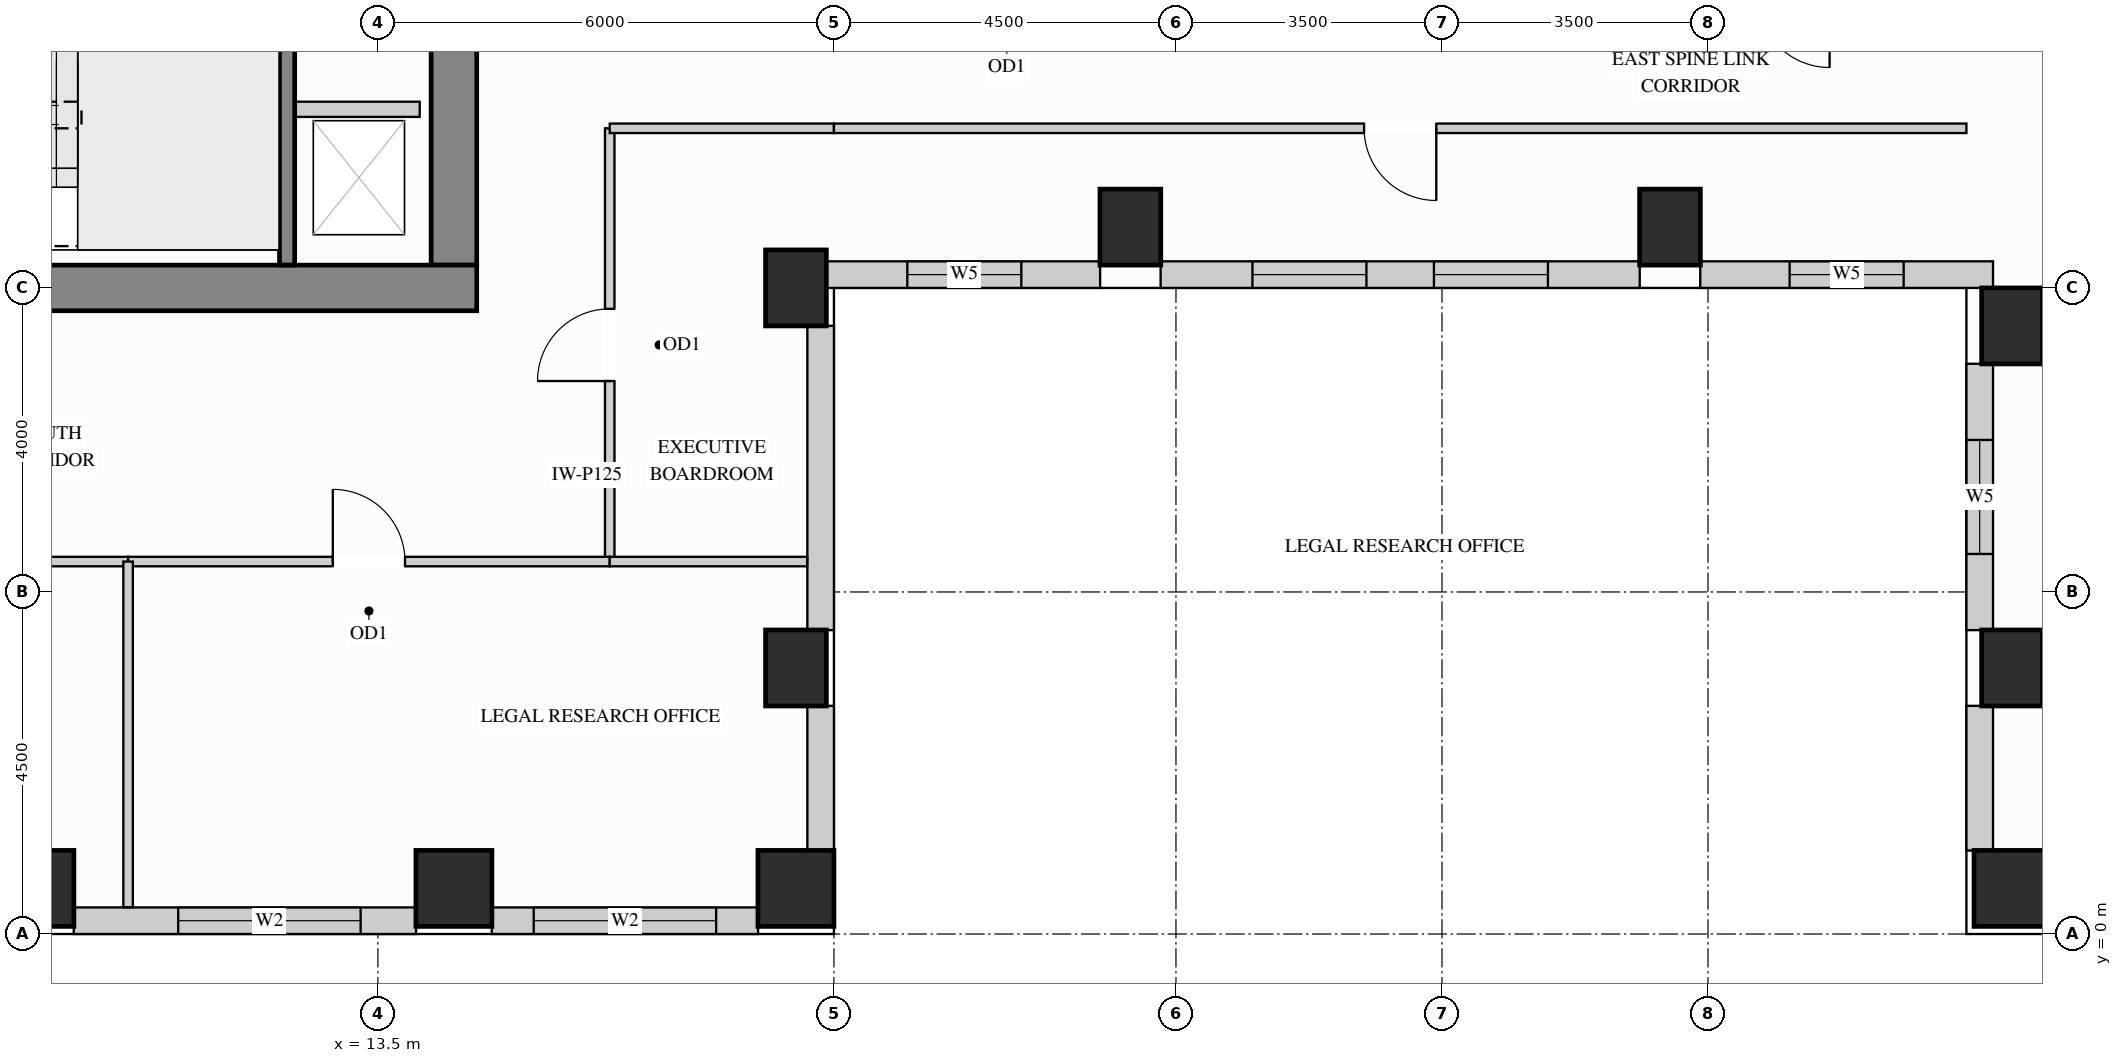
"""IFC4 building model, lengths in metres.
Left out: names, types, materials, properties, quantities, classifications, styles, units other than length and angle.
Written with IfcOpenShell. Run it as: python <this file> out.ifc"""

import sys

from ifc_helpers import new_model, si_unit, direction, frame, frame_2d, origin, origin_2d, place, context, subcontext, project, spatial, rectangle, extrude, source, transform, mapped, element, fill, save


model = new_model("IFC4")
c1 = context("Model", 3, precision=1e-05, world=origin(), true_north=direction((0.0, 1.0)))
c2 = subcontext(c1, "Body", "Model", "MODEL_VIEW")
j1 = project(units=[si_unit("LENGTHUNIT", "METRE"), si_unit("PLANEANGLEUNIT", "RADIAN")], contexts=[c1])
p1 = place(None, origin())
s1 = spatial("IfcSite", under=j1, at=p1, CompositionType="ELEMENT")
p2 = place(p1, origin())
s2 = spatial("IfcBuilding", under=s1, at=p2, CompositionType="ELEMENT")
p3 = place(p2, frame((0.0, 0.0, 153.9)))
s3 = spatial("IfcBuildingStorey", under=s2, at=p3, CompositionType="ELEMENT", Elevation=153.9)
m1 = source(origin(), c2, "Body", "SweptSolid", [
    extrude(rectangle(XDim=0.8, YDim=1.0, at=origin_2d()), origin(), (0.0, 0.0, 1.0), 3.4),
])
for number, where, z_axis, x_axis in (
    (1, (19.0, 3.5, 0.0), (0.0, 0.0, 1.0), (1.0, 0.0, 0.0)),
    (2, (19.0, 8.5, 0.0), (0.0, 0.0, 1.0), (1.0, 0.0, 0.0)),
    (3, (35.0, 3.5, 0.0), (0.0, 0.0, 1.0), (1.0, 0.0, 0.0)),
    (4, (35.0, 8.0, 0.0), (0.0, 0.0, 1.0), (1.0, 0.0, 0.0)),
    (5, (23.4, 9.3, 0.0), (0.0, 0.0, 1.0), (1.0, 0.0, 0.0)),
    (6, (30.5, 9.3, 0.0), (0.0, 0.0, 1.0), (1.0, 0.0, 0.0)),
):
    element("IfcColumn", number, at=place(p3, frame(where, z_axis=z_axis, x_axis=x_axis)), inside=s3, PredefinedType="COLUMN", context=c2, shape_type="MappedRepresentation", body=[
        mapped(m1, transform((0.0, 0.0, 0.0), x_axis=(1.0, 0.0, 0.0), y_axis=(0.0, 1.0, 0.0), z_axis=(0.0, 0.0, 1.0))),
    ])
m2 = source(origin(), c2, "Body", "SweptSolid", [
    extrude(rectangle(XDim=1.0, YDim=1.0, at=origin_2d()), origin(), (0.0, 0.0, 1.0), 3.4),
])
for number, where, z_axis, x_axis in (
    (7, (14.5, 0.6, 0.0), (0.0, 0.0, 1.0), (1.0, 0.0, 0.0)),
    (8, (19.0, 0.6, 0.0), (0.0, 0.0, 1.0), (1.0, 0.0, 0.0)),
    (9, (35.0, 0.6, 0.0), (0.0, 0.0, 1.0), (1.0, 0.0, 0.0)),
    (10, (9.0, 0.6, 0.0), (0.0, 0.0, 1.0), (1.0, 0.0, 0.0)),
):
    element("IfcColumn", number, at=place(p3, frame(where, z_axis=z_axis, x_axis=x_axis)), inside=s3, PredefinedType="COLUMN", context=c2, shape_type="MappedRepresentation", body=[
        mapped(m2, transform((0.0, 0.0, 0.0), x_axis=(1.0, 0.0, 0.0), y_axis=(0.0, 1.0, 0.0), z_axis=(0.0, 0.0, 1.0))),
    ])
m3 = source(origin(), c2, "Body", "SweptSolid", [
    extrude(rectangle(XDim=10.02, YDim=0.6, at=frame_2d((5.01, 0.0))), origin(), (0.0, 0.0, 1.0), 3.4),
])
p4 = place(p3, frame((14.5, 8.8, 0.0), z_axis=(0.0, 0.0, 1.0), x_axis=(0.0, 1.0, 0.0)))
e11 = element("IfcWall", 11, at=p4, inside=s3, PredefinedType="SHEAR", context=c2, shape_type="MappedRepresentation", body=[
    mapped(m3, transform((0.0, 0.0, 0.0), x_axis=(1.0, 0.0, 0.0), y_axis=(0.0, 1.0, 0.0), z_axis=(0.0, 0.0, 1.0))),
])
m4 = source(origin(), c2, "Body", "SweptSolid", [
    extrude(rectangle(XDim=10.6, YDim=0.6, at=frame_2d((5.3, 0.0))), origin(), (0.0, 0.0, 1.0), 3.4),
])
p5 = place(p3, frame((4.2, 8.5, 0.0), z_axis=(0.0, 0.0, 1.0), x_axis=(1.0, 0.0, 0.0)))
e12 = element("IfcWall", 12, at=p5, inside=s3, PredefinedType="SHEAR", context=c2, shape_type="MappedRepresentation", body=[
    mapped(m4, transform((0.0, 0.0, 0.0), x_axis=(1.0, 0.0, 0.0), y_axis=(0.0, 1.0, 0.0), z_axis=(0.0, 0.0, 1.0))),
])
p6 = place(p3, frame((9.498, 0.175, 0.0), z_axis=(0.0, 0.0, 1.0), x_axis=(1.0, 0.0, 0.0)))
e13 = element("IfcWall", 13, at=p6, inside=s3, PredefinedType="SOLIDWALL", context=c2, shape_type="SweptSolid", body=[
    extrude(rectangle(XDim=4.504, YDim=0.35, at=frame_2d((2.252, 0.0))), origin(), (0.0, 0.0, 1.0), 2.612),
])
p7 = place(p6, frame((1.375, 0.0, 0.78)))
e14 = element("IfcOpeningElement", 14, at=p7, cuts=e13, PredefinedType="OPENING", context=c2, shape_type="SweptSolid", body=[
    extrude(rectangle(XDim=2.4, YDim=1.652, at=frame_2d((1.2, 0.826))), frame((0.0, 0.185, 0.0), z_axis=(0.0, -1.0, 0.0), x_axis=(1.0, 0.0, 0.0)), (0.0, 0.0, 1.0), 0.37),
])
p8 = place(p3, frame((14.998, 0.175, 0.0), z_axis=(0.0, 0.0, 1.0), x_axis=(1.0, 0.0, 0.0)))
e15 = element("IfcWall", 15, at=p8, inside=s3, PredefinedType="SOLIDWALL", context=c2, shape_type="SweptSolid", body=[
    extrude(rectangle(XDim=3.504, YDim=0.35, at=frame_2d((1.752, 0.0))), origin(), (0.0, 0.0, 1.0), 2.612),
])
p9 = place(p8, frame((0.552, 0.0, 0.78)))
e16 = element("IfcOpeningElement", 16, at=p9, cuts=e15, PredefinedType="OPENING", context=c2, shape_type="SweptSolid", body=[
    extrude(rectangle(XDim=2.4, YDim=1.652, at=frame_2d((1.2, 0.826))), frame((0.0, 0.185, 0.0), z_axis=(0.0, -1.0, 0.0), x_axis=(1.0, 0.0, 0.0)), (0.0, 0.0, 1.0), 0.37),
])
m5 = source(origin(), c2, "Body", "SweptSolid", [
    extrude(rectangle(XDim=1.904, YDim=0.35, at=frame_2d((0.952, 0.0))), origin(), (0.0, 0.0, 1.0), 2.612),
])
p10 = place(p3, frame((19.325, 1.098, 0.0), z_axis=(0.0, 0.0, 1.0), x_axis=(0.0, 1.0, 0.0)))
e17 = element("IfcWall", 17, at=p10, inside=s3, PredefinedType="SOLIDWALL", context=c2, shape_type="MappedRepresentation", body=[
    mapped(m5, transform((0.0, 0.0, 0.0), x_axis=(1.0, 0.0, 0.0), y_axis=(0.0, 1.0, 0.0), z_axis=(0.0, 0.0, 1.0))),
])
m6 = source(origin(), c2, "Body", "SweptSolid", [
    extrude(rectangle(XDim=4.004, YDim=0.35, at=frame_2d((2.002, 0.0))), origin(), (0.0, 0.0, 1.0), 2.612),
])
p11 = place(p3, frame((19.325, 3.998, 0.0), z_axis=(0.0, 0.0, 1.0), x_axis=(0.0, 1.0, 0.0)))
e18 = element("IfcWall", 18, at=p11, inside=s3, PredefinedType="SOLIDWALL", context=c2, shape_type="MappedRepresentation", body=[
    mapped(m6, transform((0.0, 0.0, 0.0), x_axis=(1.0, 0.0, 0.0), y_axis=(0.0, 1.0, 0.0), z_axis=(0.0, 0.0, 1.0))),
])
p12 = place(p3, frame((19.398, 8.675, 0.0), z_axis=(0.0, 0.0, 1.0), x_axis=(1.0, 0.0, 0.0)))
e19 = element("IfcWall", 19, at=p12, inside=s3, PredefinedType="SOLIDWALL", context=c2, shape_type="SweptSolid", body=[
    extrude(rectangle(XDim=3.604, YDim=0.35, at=frame_2d((1.802, 0.0))), origin(), (0.0, 0.0, 1.0), 3.385),
])
p13 = place(p12, frame((1.067, 0.0, 0.78)))
e20 = element("IfcOpeningElement", 20, at=p13, cuts=e19, PredefinedType="OPENING", context=c2, shape_type="SweptSolid", body=[
    extrude(rectangle(XDim=1.5, YDim=2.0, at=frame_2d((0.75, 1.0))), frame((0.0, 0.185, 0.0), z_axis=(0.0, -1.0, 0.0), x_axis=(1.0, 0.0, 0.0)), (0.0, 0.0, 1.0), 0.37),
])
p14 = place(p3, frame((23.798, 8.675, 0.0), z_axis=(0.0, 0.0, 1.0), x_axis=(1.0, 0.0, 0.0)))
e21 = element("IfcWall", 21, at=p14, inside=s3, PredefinedType="SOLIDWALL", context=c2, shape_type="SweptSolid", body=[
    extrude(rectangle(XDim=6.304, YDim=0.35, at=frame_2d((3.152, 0.0))), origin(), (0.0, 0.0, 1.0), 3.385),
])
p15 = place(p14, frame((1.208, 0.0, 0.78)))
e22 = element("IfcOpeningElement", 22, at=p15, cuts=e21, PredefinedType="OPENING", context=c2, shape_type="SweptSolid", body=[
    extrude(rectangle(XDim=1.5, YDim=2.0, at=frame_2d((0.75, 1.0))), frame((0.0, 0.185, 0.0), z_axis=(0.0, -1.0, 0.0), x_axis=(1.0, 0.0, 0.0)), (0.0, 0.0, 1.0), 0.37),
])
p16 = place(p14, frame((3.596, 0.0, 0.78)))
e23 = element("IfcOpeningElement", 23, at=p16, cuts=e21, PredefinedType="OPENING", context=c2, shape_type="SweptSolid", body=[
    extrude(rectangle(XDim=1.5, YDim=2.0, at=frame_2d((0.75, 1.0))), frame((0.0, 0.185, 0.0), z_axis=(0.0, -1.0, 0.0), x_axis=(1.0, 0.0, 0.0)), (0.0, 0.0, 1.0), 0.37),
])
p17 = place(p3, frame((30.898, 8.675, 0.0), z_axis=(0.0, 0.0, 1.0), x_axis=(1.0, 0.0, 0.0)))
e24 = element("IfcWall", 24, at=p17, inside=s3, PredefinedType="SOLIDWALL", context=c2, shape_type="SweptSolid", body=[
    extrude(rectangle(XDim=3.852, YDim=0.35, at=frame_2d((1.926, 0.0))), origin(), (0.0, 0.0, 1.0), 3.385),
])
p18 = place(p17, frame((1.176, 0.0, 0.78)))
e25 = element("IfcOpeningElement", 25, at=p18, cuts=e24, PredefinedType="OPENING", context=c2, shape_type="SweptSolid", body=[
    extrude(rectangle(XDim=1.5, YDim=2.0, at=frame_2d((0.75, 1.0))), frame((0.0, 0.185, 0.0), z_axis=(0.0, -1.0, 0.0), x_axis=(1.0, 0.0, 0.0)), (0.0, 0.0, 1.0), 0.37),
])
p19 = place(p3, frame((34.575, 7.502, 0.0), z_axis=(0.0, 0.0, 1.0), x_axis=(0.0, -1.0, 0.0)))
e26 = element("IfcWall", 26, at=p19, inside=s3, PredefinedType="SOLIDWALL", context=c2, shape_type="SweptSolid", body=[
    extrude(rectangle(XDim=3.504, YDim=0.35, at=frame_2d((1.752, 0.0))), origin(), (0.0, 0.0, 1.0), 2.612),
])
p20 = place(p19, frame((1.002, 0.0, 0.78)))
e27 = element("IfcOpeningElement", 27, at=p20, cuts=e26, PredefinedType="OPENING", context=c2, shape_type="SweptSolid", body=[
    extrude(rectangle(XDim=1.5, YDim=1.652, at=frame_2d((0.75, 0.826))), frame((0.0, 0.185, 0.0), z_axis=(0.0, -1.0, 0.0), x_axis=(1.0, 0.0, 0.0)), (0.0, 0.0, 1.0), 0.37),
])
p21 = place(p3, frame((34.575, 3.002, 0.0), z_axis=(0.0, 0.0, 1.0), x_axis=(0.0, -1.0, 0.0)))
e28 = element("IfcWall", 28, at=p21, inside=s3, PredefinedType="SOLIDWALL", context=c2, shape_type="MappedRepresentation", body=[
    mapped(m5, transform((0.0, 0.0, 0.0), x_axis=(1.0, 0.0, 0.0), y_axis=(0.0, 1.0, 0.0), z_axis=(0.0, 0.0, 1.0))),
])
p22 = place(p3, frame((16.55, 4.9, 0.0), z_axis=(0.0, 0.0, 1.0), x_axis=(0.0, 1.0, 0.0)))
e29 = element("IfcWall", 29, at=p22, inside=s3, PredefinedType="PARTITIONING", context=c2, shape_type="SweptSolid", body=[
    extrude(rectangle(XDim=5.7, YDim=0.125, at=frame_2d((2.85, 0.0))), origin(), (0.0, 0.0, 1.0), 3.385),
])
p23 = place(p22, frame((2.375, 0.0, 0.0)))
e30 = element("IfcOpeningElement", 30, at=p23, cuts=e29, PredefinedType="OPENING", context=c2, shape_type="SweptSolid", body=[
    extrude(rectangle(XDim=0.95, YDim=2.15, at=frame_2d((0.475, 1.075))), frame((0.0, 0.073, 0.0), z_axis=(0.0, -1.0, 0.0), x_axis=(1.0, 0.0, 0.0)), (0.0, 0.0, 1.0), 0.145),
])
m7 = source(origin(), c2, "Body", "SweptSolid", [
    extrude(rectangle(XDim=2.95, YDim=0.125, at=frame_2d((1.475, 0.0))), origin(), (0.0, 0.0, 1.0), 3.385),
])
p24 = place(p3, frame((16.55, 10.6, 0.0), z_axis=(0.0, 0.0, 1.0), x_axis=(1.0, 0.0, 0.0)))
e31 = element("IfcWall", 31, at=p24, inside=s3, PredefinedType="PARTITIONING", context=c2, shape_type="MappedRepresentation", body=[
    mapped(m7, transform((0.0, 0.0, 0.0), x_axis=(1.0, 0.0, 0.0), y_axis=(0.0, 1.0, 0.0), z_axis=(0.0, 0.0, 1.0))),
])
p25 = place(p3, frame((19.5, 10.6, 0.0), z_axis=(0.0, 0.0, 1.0), x_axis=(1.0, 0.0, 0.0)))
e32 = element("IfcWall", 32, at=p25, inside=s3, PredefinedType="PARTITIONING", context=c2, shape_type="SweptSolid", body=[
    extrude(rectangle(XDim=14.9, YDim=0.125, at=frame_2d((7.45, 0.0))), origin(), (0.0, 0.0, 1.0), 3.385),
])
p26 = place(p25, frame((6.975, 0.0, 0.0)))
e33 = element("IfcOpeningElement", 33, at=p26, cuts=e32, PredefinedType="OPENING", context=c2, shape_type="SweptSolid", body=[
    extrude(rectangle(XDim=0.95, YDim=2.15, at=frame_2d((0.475, 1.075))), frame((0.0, 0.073, 0.0), z_axis=(0.0, -1.0, 0.0), x_axis=(1.0, 0.0, 0.0)), (0.0, 0.0, 1.0), 0.145),
])
p27 = place(p3, frame((2.45, 4.9, 0.0), z_axis=(0.0, 0.0, 1.0), x_axis=(1.0, 0.0, 0.0)))
e34 = element("IfcWall", 34, at=p27, inside=s3, PredefinedType="PARTITIONING", context=c2, shape_type="SweptSolid", body=[
    extrude(rectangle(XDim=7.763, YDim=0.125, at=frame_2d((3.881, 0.0))), origin(), (0.0, 0.0, 1.0), 2.848),
])
p28 = place(p27, frame((3.406, 0.0, 0.0)))
e35 = element("IfcOpeningElement", 35, at=p28, cuts=e34, PredefinedType="OPENING", context=c2, shape_type="SweptSolid", body=[
    extrude(rectangle(XDim=0.95, YDim=2.15, at=frame_2d((0.475, 1.075))), frame((0.0, 0.073, 0.0), z_axis=(0.0, -1.0, 0.0), x_axis=(1.0, 0.0, 0.0)), (0.0, 0.0, 1.0), 0.145),
])
p29 = place(p3, frame((10.213, 4.9, 0.0), z_axis=(0.0, 0.0, 1.0), x_axis=(1.0, 0.0, 0.0)))
e36 = element("IfcWall", 36, at=p29, inside=s3, PredefinedType="PARTITIONING", context=c2, shape_type="SweptSolid", body=[
    extrude(rectangle(XDim=6.337, YDim=0.125, at=frame_2d((3.168, 0.0))), origin(), (0.0, 0.0, 1.0), 2.848),
])
p30 = place(p29, frame((2.694, 0.0, 0.0)))
e37 = element("IfcOpeningElement", 37, at=p30, cuts=e36, PredefinedType="OPENING", context=c2, shape_type="SweptSolid", body=[
    extrude(rectangle(XDim=0.95, YDim=2.15, at=frame_2d((0.475, 1.075))), frame((0.0, 0.073, 0.0), z_axis=(0.0, -1.0, 0.0), x_axis=(1.0, 0.0, 0.0)), (0.0, 0.0, 1.0), 0.145),
])
m8 = source(origin(), c2, "Body", "SweptSolid", [
    extrude(rectangle(XDim=2.598, YDim=0.125, at=frame_2d((1.299, 0.0))), origin(), (0.0, 0.0, 1.0), 2.848),
])
p31 = place(p3, frame((16.55, 4.9, 0.0), z_axis=(0.0, 0.0, 1.0), x_axis=(1.0, 0.0, 0.0)))
e38 = element("IfcWall", 38, at=p31, inside=s3, PredefinedType="PARTITIONING", context=c2, shape_type="MappedRepresentation", body=[
    mapped(m8, transform((0.0, 0.0, 0.0), x_axis=(1.0, 0.0, 0.0), y_axis=(0.0, 1.0, 0.0), z_axis=(0.0, 0.0, 1.0))),
])
m9 = source(origin(), c2, "Body", "SweptSolid", [
    extrude(rectangle(XDim=4.548, YDim=0.125, at=frame_2d((2.274, 0.0))), origin(), (0.0, 0.0, 1.0), 3.385),
])
p32 = place(p3, frame((10.213, 0.352, 0.0), z_axis=(0.0, 0.0, 1.0), x_axis=(0.0, 1.0, 0.0)))
e39 = element("IfcWall", 39, at=p32, inside=s3, PredefinedType="PARTITIONING", context=c2, shape_type="MappedRepresentation", body=[
    mapped(m9, transform((0.0, 0.0, 0.0), x_axis=(1.0, 0.0, 0.0), y_axis=(0.0, 1.0, 0.0), z_axis=(0.0, 0.0, 1.0))),
])
m10 = source(origin(), c2, "Body", "SweptSolid", [
    extrude(rectangle(XDim=1.63, YDim=0.2, at=frame_2d((0.815, 0.0))), origin(), (0.0, 0.0, 1.0), 3.385),
])
p33 = place(p3, frame((12.42, 10.85, 0.0), z_axis=(0.0, 0.0, 1.0), x_axis=(1.0, 0.0, 0.0)))
e40 = element("IfcWall", 40, at=p33, inside=s3, PredefinedType="PARTITIONING", context=c2, shape_type="MappedRepresentation", body=[
    mapped(m10, transform((0.0, 0.0, 0.0), x_axis=(1.0, 0.0, 0.0), y_axis=(0.0, 1.0, 0.0), z_axis=(0.0, 0.0, 1.0))),
])
m11 = source(origin(), c2, "Body", "SweptSolid", [
    extrude(rectangle(XDim=3.753, YDim=0.2, at=frame_2d((1.876, 0.0))), origin(), (0.0, 0.0, 1.0), 3.4),
])
p34 = place(p3, frame((12.305, 8.802, 0.0), z_axis=(0.0, 0.0, 1.0), x_axis=(0.0, 1.0, 0.0)))
e41 = element("IfcWall", 41, at=p34, inside=s3, PredefinedType="SHEAR", context=c2, shape_type="MappedRepresentation", body=[
    mapped(m11, transform((0.0, 0.0, 0.0), x_axis=(1.0, 0.0, 0.0), y_axis=(0.0, 1.0, 0.0), z_axis=(0.0, 0.0, 1.0))),
])
m12 = source(origin(), c2, "Body", "SweptSolid", [
    extrude(rectangle(XDim=0.95, YDim=2.15, at=frame_2d((0.475, 1.075))), frame((0.0, 0.025, 0.0), z_axis=(0.0, -1.0, 0.0), x_axis=(1.0, 0.0, 0.0)), (0.0, 0.0, 1.0), 0.05),
])
p35 = place(p23, origin())
e42 = element("IfcDoor", 42, at=p35, inside=s3, OperationType="SINGLE_SWING_LEFT", PredefinedType="DOOR", context=c2, shape_type="MappedRepresentation", body=[
    mapped(m12, transform((0.0, 0.0, 0.0), x_axis=(1.0, 0.0, 0.0), y_axis=(0.0, 1.0, 0.0), z_axis=(0.0, 0.0, 1.0))),
])
fill(e30, e42)
p36 = place(p30, origin())
e43 = element("IfcDoor", 43, at=p36, inside=s3, OperationType="SINGLE_SWING_LEFT", PredefinedType="DOOR", context=c2, shape_type="MappedRepresentation", body=[
    mapped(m12, transform((0.0, 0.0, 0.0), x_axis=(1.0, 0.0, 0.0), y_axis=(0.0, 1.0, 0.0), z_axis=(0.0, 0.0, 1.0))),
])
fill(e37, e43)
p37 = place(p26, origin())
e44 = element("IfcDoor", 44, at=p37, inside=s3, OperationType="SINGLE_SWING_RIGHT", PredefinedType="DOOR", context=c2, shape_type="MappedRepresentation", body=[
    mapped(m12, transform((0.0, 0.0, 0.0), x_axis=(1.0, 0.0, 0.0), y_axis=(0.0, 1.0, 0.0), z_axis=(0.0, 0.0, 1.0))),
])
fill(e33, e44)
m13 = source(origin(), c2, "Body", "SweptSolid", [
    extrude(rectangle(XDim=2.4, YDim=1.652, at=frame_2d((1.2, 0.826))), frame((0.0, 0.03, 0.0), z_axis=(0.0, -1.0, 0.0), x_axis=(1.0, 0.0, 0.0)), (0.0, 0.0, 1.0), 0.06),
])
p38 = place(p7, origin())
e45 = element("IfcWindow", 45, at=p38, inside=s3, PartitioningType="SINGLE_PANEL", PredefinedType="WINDOW", context=c2, shape_type="MappedRepresentation", body=[
    mapped(m13, transform((0.0, 0.0, 0.0), x_axis=(1.0, 0.0, 0.0), y_axis=(0.0, 1.0, 0.0), z_axis=(0.0, 0.0, 1.0))),
])
fill(e14, e45)
p39 = place(p9, origin())
e46 = element("IfcWindow", 46, at=p39, inside=s3, PartitioningType="SINGLE_PANEL", PredefinedType="WINDOW", context=c2, shape_type="MappedRepresentation", body=[
    mapped(m13, transform((0.0, 0.0, 0.0), x_axis=(1.0, 0.0, 0.0), y_axis=(0.0, 1.0, 0.0), z_axis=(0.0, 0.0, 1.0))),
])
fill(e16, e46)
m14 = source(origin(), c2, "Body", "SweptSolid", [
    extrude(rectangle(XDim=1.5, YDim=2.0, at=frame_2d((0.75, 1.0))), frame((0.0, 0.03, 0.0), z_axis=(0.0, -1.0, 0.0), x_axis=(1.0, 0.0, 0.0)), (0.0, 0.0, 1.0), 0.06),
])
p40 = place(p13, origin())
e47 = element("IfcWindow", 47, at=p40, inside=s3, PartitioningType="SINGLE_PANEL", PredefinedType="WINDOW", context=c2, shape_type="MappedRepresentation", body=[
    mapped(m14, transform((0.0, 0.0, 0.0), x_axis=(1.0, 0.0, 0.0), y_axis=(0.0, 1.0, 0.0), z_axis=(0.0, 0.0, 1.0))),
])
fill(e20, e47)
p41 = place(p15, origin())
e48 = element("IfcWindow", 48, at=p41, inside=s3, PartitioningType="SINGLE_PANEL", PredefinedType="WINDOW", context=c2, shape_type="MappedRepresentation", body=[
    mapped(m14, transform((0.0, 0.0, 0.0), x_axis=(1.0, 0.0, 0.0), y_axis=(0.0, 1.0, 0.0), z_axis=(0.0, 0.0, 1.0))),
])
fill(e22, e48)
p42 = place(p16, origin())
e49 = element("IfcWindow", 49, at=p42, inside=s3, PartitioningType="SINGLE_PANEL", PredefinedType="WINDOW", context=c2, shape_type="MappedRepresentation", body=[
    mapped(m14, transform((0.0, 0.0, 0.0), x_axis=(1.0, 0.0, 0.0), y_axis=(0.0, 1.0, 0.0), z_axis=(0.0, 0.0, 1.0))),
])
fill(e23, e49)
p43 = place(p18, origin())
e50 = element("IfcWindow", 50, at=p43, inside=s3, PartitioningType="SINGLE_PANEL", PredefinedType="WINDOW", context=c2, shape_type="MappedRepresentation", body=[
    mapped(m14, transform((0.0, 0.0, 0.0), x_axis=(1.0, 0.0, 0.0), y_axis=(0.0, 1.0, 0.0), z_axis=(0.0, 0.0, 1.0))),
])
fill(e25, e50)
m15 = source(origin(), c2, "Body", "SweptSolid", [
    extrude(rectangle(XDim=1.5, YDim=1.652, at=frame_2d((0.75, 0.826))), frame((0.0, 0.03, 0.0), z_axis=(0.0, -1.0, 0.0), x_axis=(1.0, 0.0, 0.0)), (0.0, 0.0, 1.0), 0.06),
])
p44 = place(p20, origin())
e51 = element("IfcWindow", 51, at=p44, inside=s3, PartitioningType="SINGLE_PANEL", PredefinedType="WINDOW", context=c2, shape_type="MappedRepresentation", body=[
    mapped(m15, transform((0.0, 0.0, 0.0), x_axis=(1.0, 0.0, 0.0), y_axis=(0.0, 1.0, 0.0), z_axis=(0.0, 0.0, 1.0))),
])
fill(e27, e51)
save(model, sys.argv[1])
